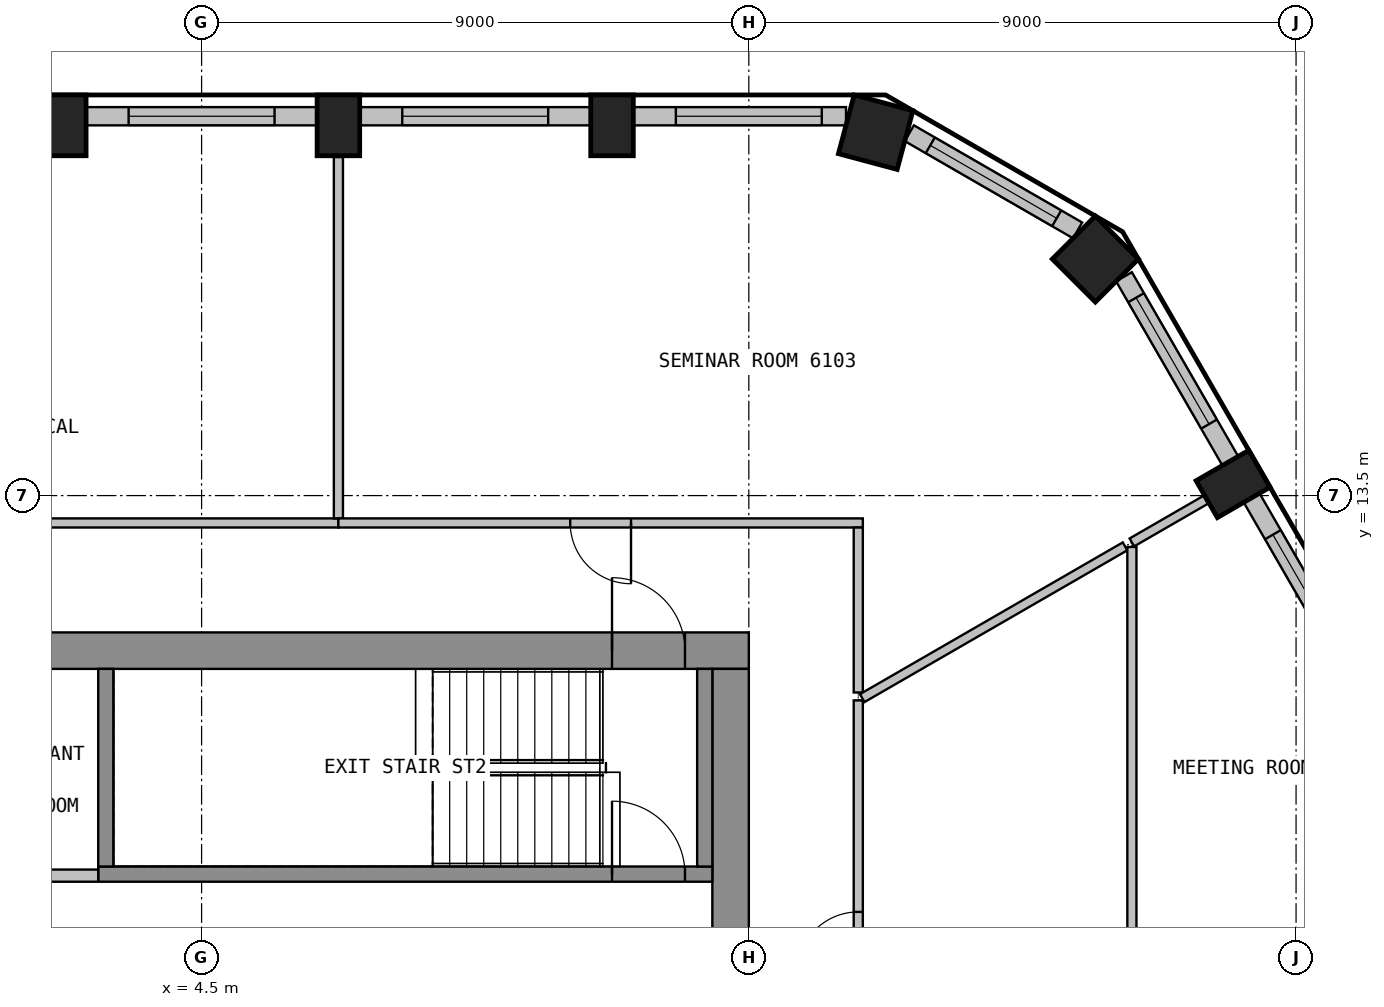
"""IFC4 building model, lengths in metres.
Left out: names, types, materials, properties, quantities, classifications, styles, units other than length and angle.
Written with IfcOpenShell. Run it as: python <this file> out.ifc"""

import sys

from ifc_helpers import new_model, si_unit, direction, frame, frame_2d, origin, origin_2d, place, context, subcontext, project, spatial, rectangle, extrude, element, fill, save


model = new_model("IFC4")
c1 = context("Model", 3, precision=1e-05, world=origin(), true_north=direction((0.0, 1.0)))
c2 = subcontext(c1, "Body", "Model", "MODEL_VIEW")
j1 = project(units=[si_unit("LENGTHUNIT", "METRE"), si_unit("PLANEANGLEUNIT", "RADIAN")], contexts=[c1])
p1 = place(None, origin())
s1 = spatial("IfcSite", under=j1, at=p1, CompositionType="ELEMENT")
p2 = place(p1, origin())
s2 = spatial("IfcBuilding", under=s1, at=p2, CompositionType="ELEMENT")
p3 = place(p2, frame((0.0, 0.0, 246.9)))
s3 = spatial("IfcBuildingStorey", under=s2, at=p3, CompositionType="ELEMENT", Elevation=246.9)
p4 = place(p3, frame((21.464, 13.691, 0.0), z_axis=(0.0, 0.0, 1.0), x_axis=(-0.5, 0.866025403784, 0.0)))
e1 = element("IfcColumn", 1, at=p4, inside=s3, PredefinedType="COLUMN", context=c2, shape_type="SweptSolid", body=[
    extrude(rectangle(XDim=0.7, YDim=1.0, at=origin_2d()), origin(), (0.0, 0.0, 1.0), 3.575),
])
for number, where, z_axis, x_axis in (
    (2, (19.199, 17.39, 0.0), (0.0, 0.0, 1.0), (-0.707, 0.707, 0.0)),
    (3, (15.586, 19.476, 0.0), (0.0, 0.0, 1.0), (-0.966, 0.259, 0.0)),
):
    element("IfcColumn", number, at=place(p3, frame(where, z_axis=z_axis, x_axis=x_axis)), inside=s3, PredefinedType="COLUMN", context=c2, shape_type="SweptSolid", body=[
        extrude(rectangle(XDim=1.0, YDim=1.0, at=origin_2d()), origin(), (0.0, 0.0, 1.0), 3.575),
    ])
for number, where, z_axis, x_axis in (
    (4, (11.25, 19.588, 0.0), (0.0, 0.0, 1.0), (-1.0, 0.0, 0.0)),
    (5, (6.75, 19.588, 0.0), (0.0, 0.0, 1.0), (-1.0, 0.0, 0.0)),
    (6, (2.25, 19.588, 0.0), (0.0, 0.0, 1.0), (-1.0, 0.0, 0.0)),
):
    element("IfcColumn", number, at=place(p3, frame(where, z_axis=z_axis, x_axis=x_axis)), inside=s3, PredefinedType="COLUMN", context=c2, shape_type="SweptSolid", body=[
        extrude(rectangle(XDim=0.7, YDim=1.0, at=origin_2d()), origin(), (0.0, 0.0, 1.0), 3.575),
    ])
p5 = place(p3, frame((23.669, 10.173, 0.0), z_axis=(0.0, 0.0, 1.0), x_axis=(-0.499982058975, 0.866035761792, 0.0)))
e7 = element("IfcWall", 7, at=p5, inside=s3, PredefinedType="SOLIDWALL", context=c2, shape_type="SweptSolid", body=[
    extrude(rectangle(XDim=3.799, YDim=0.3, at=frame_2d((1.899, 0.0))), origin(), (0.0, 0.0, 1.0), 3.575),
])
p6 = place(p5, frame((0.699, 0.0, 0.9)))
e8 = element("IfcOpeningElement", 8, at=p6, cuts=e7, PredefinedType="OPENING", context=c2, shape_type="SweptSolid", body=[
    extrude(rectangle(XDim=2.4, YDim=2.1, at=frame_2d((1.2, 1.05))), frame((0.0, 0.16, 0.0), z_axis=(0.0, -1.0, 0.0), x_axis=(1.0, 0.0, 0.0)), (0.0, 0.0, 1.0), 0.32),
])
p7 = place(p3, frame((21.419, 14.07, 0.0), z_axis=(0.0, 0.0, 1.0), x_axis=(-0.499960102815, 0.866048437209, 0.0)))
e9 = element("IfcWall", 9, at=p7, inside=s3, PredefinedType="SOLIDWALL", context=c2, shape_type="SweptSolid", body=[
    extrude(rectangle(XDim=3.498, YDim=0.3, at=frame_2d((1.749, 0.0))), origin(), (0.0, 0.0, 1.0), 3.575),
])
p8 = place(p7, frame((0.699, 0.0, 0.9)))
e10 = element("IfcOpeningElement", 10, at=p8, cuts=e9, PredefinedType="OPENING", context=c2, shape_type="SweptSolid", body=[
    extrude(rectangle(XDim=2.4, YDim=2.1, at=frame_2d((1.2, 1.05))), frame((0.0, 0.16, 0.0), z_axis=(0.0, -1.0, 0.0), x_axis=(1.0, 0.0, 0.0)), (0.0, 0.0, 1.0), 0.32),
])
p9 = place(p3, frame((18.908, 17.861, 0.0), z_axis=(0.0, 0.0, 1.0), x_axis=(-0.866025316205, 0.500000151692, 0.0)))
e11 = element("IfcWall", 11, at=p9, inside=s3, PredefinedType="SOLIDWALL", context=c2, shape_type="SweptSolid", body=[
    extrude(rectangle(XDim=3.196, YDim=0.3, at=frame_2d((1.598, 0.0))), origin(), (0.0, 0.0, 1.0), 3.575),
])
p10 = place(p9, frame((0.398, 0.0, 0.9)))
e12 = element("IfcOpeningElement", 12, at=p10, cuts=e11, PredefinedType="OPENING", context=c2, shape_type="SweptSolid", body=[
    extrude(rectangle(XDim=2.4, YDim=2.1, at=frame_2d((1.2, 1.05))), frame((0.0, 0.16, 0.0), z_axis=(0.0, -1.0, 0.0), x_axis=(1.0, 0.0, 0.0)), (0.0, 0.0, 1.0), 0.32),
])
p11 = place(p3, frame((15.098, 19.739, 0.0), z_axis=(0.0, 0.0, 1.0), x_axis=(-1.0, 0.0, 0.0)))
e13 = element("IfcWall", 13, at=p11, inside=s3, PredefinedType="SOLIDWALL", context=c2, shape_type="SweptSolid", body=[
    extrude(rectangle(XDim=3.498, YDim=0.3, at=frame_2d((1.749, 0.0))), origin(), (0.0, 0.0, 1.0), 3.575),
])
p12 = place(p11, frame((0.398, 0.0, 0.9)))
e14 = element("IfcOpeningElement", 14, at=p12, cuts=e13, PredefinedType="OPENING", context=c2, shape_type="SweptSolid", body=[
    extrude(rectangle(XDim=2.4, YDim=2.1, at=frame_2d((1.2, 1.05))), frame((0.0, 0.16, 0.0), z_axis=(0.0, -1.0, 0.0), x_axis=(1.0, 0.0, 0.0)), (0.0, 0.0, 1.0), 0.32),
])
p13 = place(p3, frame((10.899, 19.739, 0.0), z_axis=(0.0, 0.0, 1.0), x_axis=(-1.0, 0.0, 0.0)))
e15 = element("IfcWall", 15, at=p13, inside=s3, PredefinedType="SOLIDWALL", context=c2, shape_type="SweptSolid", body=[
    extrude(rectangle(XDim=3.799, YDim=0.3, at=frame_2d((1.899, 0.0))), origin(), (0.0, 0.0, 1.0), 3.575),
])
p14 = place(p13, frame((0.699, 0.0, 0.9)))
e16 = element("IfcOpeningElement", 16, at=p14, cuts=e15, PredefinedType="OPENING", context=c2, shape_type="SweptSolid", body=[
    extrude(rectangle(XDim=2.4, YDim=2.1, at=frame_2d((1.2, 1.05))), frame((0.0, 0.16, 0.0), z_axis=(0.0, -1.0, 0.0), x_axis=(1.0, 0.0, 0.0)), (0.0, 0.0, 1.0), 0.32),
])
p15 = place(p3, frame((6.399, 19.739, 0.0), z_axis=(0.0, 0.0, 1.0), x_axis=(-1.0, 0.0, 0.0)))
e17 = element("IfcWall", 17, at=p15, inside=s3, PredefinedType="SOLIDWALL", context=c2, shape_type="SweptSolid", body=[
    extrude(rectangle(XDim=3.799, YDim=0.3, at=frame_2d((1.899, 0.0))), origin(), (0.0, 0.0, 1.0), 3.575),
])
p16 = place(p15, frame((0.699, 0.0, 0.9)))
e18 = element("IfcOpeningElement", 18, at=p16, cuts=e17, PredefinedType="OPENING", context=c2, shape_type="SweptSolid", body=[
    extrude(rectangle(XDim=2.4, YDim=2.1, at=frame_2d((1.2, 1.05))), frame((0.0, 0.16, 0.0), z_axis=(0.0, -1.0, 0.0), x_axis=(1.0, 0.0, 0.0)), (0.0, 0.0, 1.0), 0.32),
])
p17 = place(p3, frame((-13.5, 10.95, 0.0), z_axis=(0.0, 0.0, 1.0), x_axis=(1.0, 0.0, 0.0)))
e19 = element("IfcWall", 19, at=p17, inside=s3, PredefinedType="SHEAR", context=c2, shape_type="SweptSolid", body=[
    extrude(rectangle(XDim=27.0, YDim=0.6, at=frame_2d((13.5, 0.0))), origin(), (0.0, 0.0, 1.0), 3.575),
])
p18 = place(p17, frame((12.3, 0.0, 0.0)))
e20 = element("IfcOpeningElement", 20, at=p18, cuts=e19, PredefinedType="OPENING", context=c2, shape_type="SweptSolid", body=[
    extrude(rectangle(XDim=2.4, YDim=2.1, at=frame_2d((1.2, 1.05))), frame((0.0, 0.31, 0.0), z_axis=(0.0, -1.0, 0.0), x_axis=(1.0, 0.0, 0.0)), (0.0, 0.0, 1.0), 0.62),
])
p19 = place(p17, frame((1.05, 0.0, 0.0)))
e21 = element("IfcOpeningElement", 21, at=p19, cuts=e19, PredefinedType="OPENING", context=c2, shape_type="SweptSolid", body=[
    extrude(rectangle(XDim=1.2, YDim=2.1, at=frame_2d((0.6, 1.05))), frame((0.0, 0.31, 0.0), z_axis=(0.0, -1.0, 0.0), x_axis=(1.0, 0.0, 0.0)), (0.0, 0.0, 1.0), 0.62),
])
p20 = place(p17, frame((24.75, 0.0, 0.0)))
e22 = element("IfcOpeningElement", 22, at=p20, cuts=e19, PredefinedType="OPENING", context=c2, shape_type="SweptSolid", body=[
    extrude(rectangle(XDim=1.2, YDim=2.1, at=frame_2d((0.6, 1.05))), frame((0.0, 0.31, 0.0), z_axis=(0.0, -1.0, 0.0), x_axis=(1.0, 0.0, 0.0)), (0.0, 0.0, 1.0), 0.62),
])
p21 = place(p3, frame((13.2, -10.65, 0.0), z_axis=(0.0, 0.0, 1.0), x_axis=(0.0, 1.0, 0.0)))
e23 = element("IfcWall", 23, at=p21, inside=s3, PredefinedType="SHEAR", context=c2, shape_type="SweptSolid", body=[
    extrude(rectangle(XDim=21.3, YDim=0.6, at=frame_2d((10.65, 0.0))), origin(), (0.0, 0.0, 1.0), 3.575),
])
p22 = place(p21, frame((9.45, 0.0, 0.0)))
e24 = element("IfcOpeningElement", 24, at=p22, cuts=e23, PredefinedType="OPENING", context=c2, shape_type="SweptSolid", body=[
    extrude(rectangle(XDim=2.4, YDim=2.1, at=frame_2d((1.2, 1.05))), frame((0.0, 0.31, 0.0), z_axis=(0.0, -1.0, 0.0), x_axis=(1.0, 0.0, 0.0)), (0.0, 0.0, 1.0), 0.62),
])
p23 = place(p3, frame((2.8, 7.275, 0.0), z_axis=(0.0, 0.0, 1.0), x_axis=(1.0, 0.0, 0.0)))
e25 = element("IfcWall", 25, at=p23, inside=s3, PredefinedType="SHEAR", context=c2, shape_type="SweptSolid", body=[
    extrude(rectangle(XDim=10.1, YDim=0.25, at=frame_2d((5.05, 0.0))), origin(), (0.0, 0.0, 1.0), 3.575),
])
p24 = place(p23, frame((8.45, 0.0, 0.0)))
e26 = element("IfcOpeningElement", 26, at=p24, cuts=e25, PredefinedType="OPENING", context=c2, shape_type="SweptSolid", body=[
    extrude(rectangle(XDim=1.2, YDim=2.1, at=frame_2d((0.6, 1.05))), frame((0.0, 0.135, 0.0), z_axis=(0.0, -1.0, 0.0), x_axis=(1.0, 0.0, 0.0)), (0.0, 0.0, 1.0), 0.27),
])
for number, where, z_axis, x_axis in (
    (27, (2.925, 7.4, 0.0), (0.0, 0.0, 1.0), (0.0, 1.0, 0.0)),
    (28, (12.775, 7.4, 0.0), (0.0, 0.0, 1.0), (0.0, 1.0, 0.0)),
):
    element("IfcWall", number, at=place(p3, frame(where, z_axis=z_axis, x_axis=x_axis)), inside=s3, PredefinedType="SHEAR", context=c2, shape_type="SweptSolid", body=[
        extrude(rectangle(XDim=3.25, YDim=0.25, at=frame_2d((1.625, 0.0))), origin(), (0.0, 0.0, 1.0), 3.575),
    ])
p25 = place(p3, frame((1.4, 7.25, 0.0), z_axis=(0.0, 0.0, 1.0), x_axis=(1.0, 0.0, 0.0)))
e29 = element("IfcWall", 29, at=p25, inside=s3, PredefinedType="PARTITIONING", context=c2, shape_type="SweptSolid", body=[
    extrude(rectangle(XDim=1.4, YDim=0.2, at=frame_2d((0.7, 0.0))), origin(), (0.0, 0.0, 1.0), 3.575),
])
p26 = place(p3, frame((6.75, 13.05, 0.0), z_axis=(0.0, 0.0, 1.0), x_axis=(-1.0, 0.0, 0.0)))
e30 = element("IfcWall", 30, at=p26, inside=s3, PredefinedType="PARTITIONING", context=c2, shape_type="SweptSolid", body=[
    extrude(rectangle(XDim=13.5, YDim=0.15, at=frame_2d((6.75, 0.0))), origin(), (0.0, 0.0, 1.0), 3.575),
])
p27 = place(p26, frame((6.25, 0.0, 0.0)))
e31 = element("IfcOpeningElement", 31, at=p27, cuts=e30, PredefinedType="OPENING", context=c2, shape_type="SweptSolid", body=[
    extrude(rectangle(XDim=1.0, YDim=2.1, at=frame_2d((0.5, 1.05))), frame((0.0, 0.085, 0.0), z_axis=(0.0, -1.0, 0.0), x_axis=(1.0, 0.0, 0.0)), (0.0, 0.0, 1.0), 0.17),
])
p28 = place(p3, frame((6.75, 19.069, 0.0), z_axis=(0.0, 0.0, 1.0), x_axis=(0.0, -1.0, 0.0)))
e32 = element("IfcWall", 32, at=p28, inside=s3, PredefinedType="PARTITIONING", context=c2, shape_type="SweptSolid", body=[
    extrude(rectangle(XDim=5.944, YDim=0.15, at=frame_2d((2.972, 0.0))), origin(), (0.0, 0.0, 1.0), 3.575),
])
p29 = place(p3, frame((15.375, 13.05, 0.0), z_axis=(0.0, 0.0, 1.0), x_axis=(-1.0, 0.0, 0.0)))
e33 = element("IfcWall", 33, at=p29, inside=s3, PredefinedType="PARTITIONING", context=c2, shape_type="SweptSolid", body=[
    extrude(rectangle(XDim=8.625, YDim=0.15, at=frame_2d((4.312, 0.0))), origin(), (0.0, 0.0, 1.0), 3.575),
])
p30 = place(p29, frame((3.812, 0.0, 0.0)))
e34 = element("IfcOpeningElement", 34, at=p30, cuts=e33, PredefinedType="OPENING", context=c2, shape_type="SweptSolid", body=[
    extrude(rectangle(XDim=1.0, YDim=2.1, at=frame_2d((0.5, 1.05))), frame((0.0, 0.085, 0.0), z_axis=(0.0, -1.0, 0.0), x_axis=(1.0, 0.0, 0.0)), (0.0, 0.0, 1.0), 0.17),
])
p31 = place(p3, frame((15.3, 2.175, 0.0), z_axis=(0.0, 0.0, 1.0), x_axis=(0.0, 1.0, 0.0)))
e35 = element("IfcWall", 35, at=p31, inside=s3, PredefinedType="PARTITIONING", context=c2, shape_type="SweptSolid", body=[
    extrude(rectangle(XDim=7.957, YDim=0.15, at=frame_2d((3.979, 0.0))), origin(), (0.0, 0.0, 1.0), 3.575),
])
p32 = place(p31, frame((3.479, 0.0, 0.0)))
e36 = element("IfcOpeningElement", 36, at=p32, cuts=e35, PredefinedType="OPENING", context=c2, shape_type="SweptSolid", body=[
    extrude(rectangle(XDim=1.0, YDim=2.1, at=frame_2d((0.5, 1.05))), frame((0.0, 0.085, 0.0), z_axis=(0.0, -1.0, 0.0), x_axis=(1.0, 0.0, 0.0)), (0.0, 0.0, 1.0), 0.17),
])
p33 = place(p3, frame((15.3, 10.262, 0.0), z_axis=(0.0, 0.0, 1.0), x_axis=(0.0, 1.0, 0.0)))
e37 = element("IfcWall", 37, at=p33, inside=s3, PredefinedType="PARTITIONING", context=c2, shape_type="SweptSolid", body=[
    extrude(rectangle(XDim=2.713, YDim=0.15, at=frame_2d((1.356, 0.0))), origin(), (0.0, 0.0, 1.0), 3.575),
])
p34 = place(p3, frame((19.688, 12.665, 0.0), z_axis=(0.0, 0.0, 1.0), x_axis=(-0.866025118187, -0.500000494669, 0.0)))
e38 = element("IfcWall", 38, at=p34, inside=s3, PredefinedType="PARTITIONING", context=c2, shape_type="SweptSolid", body=[
    extrude(rectangle(XDim=4.991, YDim=0.15, at=frame_2d((2.496, 0.0))), origin(), (0.0, 0.0, 1.0), 3.575),
])
p35 = place(p3, frame((19.8, 12.655, 0.0), z_axis=(0.0, 0.0, 1.0), x_axis=(0.0, -1.0, 0.0)))
e39 = element("IfcWall", 39, at=p35, inside=s3, PredefinedType="PARTITIONING", context=c2, shape_type="SweptSolid", body=[
    extrude(rectangle(XDim=10.33, YDim=0.15, at=frame_2d((5.165, 0.0))), origin(), (0.0, 0.0, 1.0), 3.575),
])
p36 = place(p3, frame((21.014, 13.431, 0.0), z_axis=(0.0, 0.0, 1.0), x_axis=(-0.865918715181, -0.500184744569, 0.0)))
e40 = element("IfcWall", 40, at=p36, inside=s3, PredefinedType="PARTITIONING", context=c2, shape_type="SweptSolid", body=[
    extrude(rectangle(XDim=1.402, YDim=0.15, at=frame_2d((0.701, 0.0))), origin(), (0.0, 0.0, 1.0), 3.575),
])
p37 = place(p6, origin())
e41 = element("IfcWindow", 41, at=p37, inside=s3, PartitioningType="SINGLE_PANEL", PredefinedType="WINDOW", context=c2, shape_type="SweptSolid", body=[
    extrude(rectangle(XDim=2.4, YDim=2.1, at=frame_2d((1.2, 1.05))), frame((0.0, 0.03, 0.0), z_axis=(0.0, -1.0, 0.0), x_axis=(1.0, 0.0, 0.0)), (0.0, 0.0, 1.0), 0.06),
])
fill(e8, e41)
p38 = place(p8, origin())
e42 = element("IfcWindow", 42, at=p38, inside=s3, PartitioningType="SINGLE_PANEL", PredefinedType="WINDOW", context=c2, shape_type="SweptSolid", body=[
    extrude(rectangle(XDim=2.4, YDim=2.1, at=frame_2d((1.2, 1.05))), frame((0.0, 0.03, 0.0), z_axis=(0.0, -1.0, 0.0), x_axis=(1.0, 0.0, 0.0)), (0.0, 0.0, 1.0), 0.06),
])
fill(e10, e42)
p39 = place(p10, origin())
e43 = element("IfcWindow", 43, at=p39, inside=s3, PartitioningType="SINGLE_PANEL", PredefinedType="WINDOW", context=c2, shape_type="SweptSolid", body=[
    extrude(rectangle(XDim=2.4, YDim=2.1, at=frame_2d((1.2, 1.05))), frame((0.0, 0.03, 0.0), z_axis=(0.0, -1.0, 0.0), x_axis=(1.0, 0.0, 0.0)), (0.0, 0.0, 1.0), 0.06),
])
fill(e12, e43)
p40 = place(p12, origin())
e44 = element("IfcWindow", 44, at=p40, inside=s3, PartitioningType="SINGLE_PANEL", PredefinedType="WINDOW", context=c2, shape_type="SweptSolid", body=[
    extrude(rectangle(XDim=2.4, YDim=2.1, at=frame_2d((1.2, 1.05))), frame((0.0, 0.03, 0.0), z_axis=(0.0, -1.0, 0.0), x_axis=(1.0, 0.0, 0.0)), (0.0, 0.0, 1.0), 0.06),
])
fill(e14, e44)
p41 = place(p14, origin())
e45 = element("IfcWindow", 45, at=p41, inside=s3, PartitioningType="SINGLE_PANEL", PredefinedType="WINDOW", context=c2, shape_type="SweptSolid", body=[
    extrude(rectangle(XDim=2.4, YDim=2.1, at=frame_2d((1.2, 1.05))), frame((0.0, 0.03, 0.0), z_axis=(0.0, -1.0, 0.0), x_axis=(1.0, 0.0, 0.0)), (0.0, 0.0, 1.0), 0.06),
])
fill(e16, e45)
p42 = place(p16, origin())
e46 = element("IfcWindow", 46, at=p42, inside=s3, PartitioningType="SINGLE_PANEL", PredefinedType="WINDOW", context=c2, shape_type="SweptSolid", body=[
    extrude(rectangle(XDim=2.4, YDim=2.1, at=frame_2d((1.2, 1.05))), frame((0.0, 0.03, 0.0), z_axis=(0.0, -1.0, 0.0), x_axis=(1.0, 0.0, 0.0)), (0.0, 0.0, 1.0), 0.06),
])
fill(e18, e46)
p43 = place(p20, origin())
e47 = element("IfcDoor", 47, at=p43, inside=s3, OperationType="SINGLE_SWING_RIGHT", PredefinedType="DOOR", context=c2, shape_type="SweptSolid", body=[
    extrude(rectangle(XDim=1.2, YDim=2.1, at=frame_2d((0.6, 1.05))), frame((0.0, 0.025, 0.0), z_axis=(0.0, -1.0, 0.0), x_axis=(1.0, 0.0, 0.0)), (0.0, 0.0, 1.0), 0.05),
])
fill(e22, e47)
p44 = place(p24, origin())
e48 = element("IfcDoor", 48, at=p44, inside=s3, OperationType="SINGLE_SWING_LEFT", PredefinedType="DOOR", context=c2, shape_type="SweptSolid", body=[
    extrude(rectangle(XDim=1.2, YDim=2.1, at=frame_2d((0.6, 1.05))), frame((0.0, 0.025, 0.0), z_axis=(0.0, -1.0, 0.0), x_axis=(1.0, 0.0, 0.0)), (0.0, 0.0, 1.0), 0.05),
])
fill(e26, e48)
p45 = place(p30, origin())
e49 = element("IfcDoor", 49, at=p45, inside=s3, OperationType="SINGLE_SWING_LEFT", PredefinedType="DOOR", context=c2, shape_type="SweptSolid", body=[
    extrude(rectangle(XDim=1.0, YDim=2.1, at=frame_2d((0.5, 1.05))), frame((0.0, 0.025, 0.0), z_axis=(0.0, -1.0, 0.0), x_axis=(1.0, 0.0, 0.0)), (0.0, 0.0, 1.0), 0.05),
])
fill(e34, e49)
p46 = place(p32, origin())
e50 = element("IfcDoor", 50, at=p46, inside=s3, OperationType="SINGLE_SWING_LEFT", PredefinedType="DOOR", context=c2, shape_type="SweptSolid", body=[
    extrude(rectangle(XDim=1.0, YDim=2.1, at=frame_2d((0.5, 1.05))), frame((0.0, 0.025, 0.0), z_axis=(0.0, -1.0, 0.0), x_axis=(1.0, 0.0, 0.0)), (0.0, 0.0, 1.0), 0.05),
])
fill(e36, e50)
save(model, sys.argv[1])
